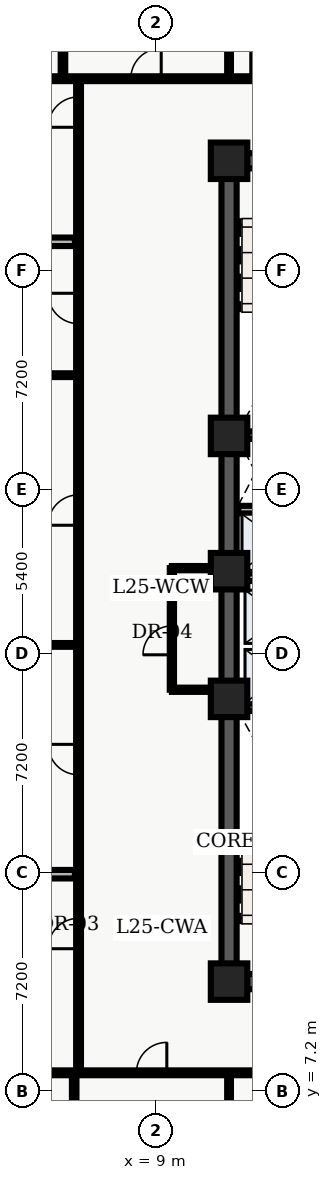
"""IFC4 building model, lengths in metres.
Left out: names, types, materials, properties, quantities, classifications, styles, units other than length and angle.
Written with IfcOpenShell. Run it as: python <this file> out.ifc"""

import sys

from ifc_helpers import new_model, entity, si_unit, converted_unit, direction, frame, origin_with_axes, origin_2d_with_axis, place, context, subcontext, project, spatial, polyline, rectangle, outline, extrude, element, fill, save


model = new_model("IFC4")
c1 = context("Model", 3, precision=1e-05, world=origin_with_axes(), true_north=direction((0.0, 1.0)))
c2 = subcontext(c1, "Body", "Model", "MODEL_VIEW")
j1 = project(units=[si_unit("LENGTHUNIT", "METRE"), converted_unit("PLANEANGLEUNIT", "DEGREE", entity("IfcPlaneAngleMeasure", 0.017), si_unit("PLANEANGLEUNIT", "RADIAN"), dimensions=[0, 0, 0, 0, 0, 0, 0])], contexts=[c1])
p1 = place(None, origin_with_axes())
s1 = spatial("IfcSite", under=j1, at=p1, CompositionType="ELEMENT")
p2 = place(p1, origin_with_axes())
s2 = spatial("IfcBuilding", under=s1, at=p2, CompositionType="ELEMENT")
p3 = place(p2, frame((0.0, 0.0, 104.7), z_axis=(0.0, 0.0, 1.0), x_axis=(1.0, 0.0, 0.0)))
s3 = spatial("IfcBuildingStorey", under=s2, at=p3, CompositionType="ELEMENT", Elevation=104.7)
p4 = place(p3, frame((11.4, 10.8, 0.0), z_axis=(0.0, 0.0, 1.0), x_axis=(0.0, 1.0, 0.0)))
e1 = element("IfcWall", 1, at=p4, inside=s3, PredefinedType="SHEAR", context=c2, shape_type="SweptSolid", body=[
    extrude(outline(polyline([(0.0, -0.25), (27.0, -0.25), (27.0, 0.25), (0.0, 0.25), (0.0, -0.25)])), origin_with_axes(), (0.0, 0.0, 1.0), 3.66),
])
p5 = place(p3, frame((11.4, 10.8, 0.0), z_axis=(0.0, 0.0, 1.0), x_axis=(1.0, 0.0, 0.0)))
e2 = element("IfcWall", 2, at=p5, inside=s3, PredefinedType="SHEAR", context=c2, shape_type="SweptSolid", body=[
    extrude(outline(polyline([(0.0, -0.25), (7.2, -0.25), (7.2, 0.25), (0.0, 0.25), (0.0, -0.25)])), origin_with_axes(), (0.0, 0.0, 1.0), 3.66),
])
p6 = place(p5, frame((2.625, 0.0, 0.0), z_axis=(0.0, 0.0, 1.0), x_axis=(1.0, 0.0, 0.0)))
e3 = element("IfcOpeningElement", 3, at=p6, cuts=e2, PredefinedType="OPENING", context=c2, shape_type="SweptSolid", body=[
    extrude(rectangle(XDim=1.05, YDim=0.52, at=origin_2d_with_axis()), origin_with_axes(), (0.0, 0.0, 1.0), 2.15),
])
p7 = place(p3, frame((11.4, 37.8, 0.0), z_axis=(0.0, 0.0, 1.0), x_axis=(1.0, 0.0, 0.0)))
e4 = element("IfcWall", 4, at=p7, inside=s3, PredefinedType="SHEAR", context=c2, shape_type="SweptSolid", body=[
    extrude(outline(polyline([(0.0, -0.25), (7.2, -0.25), (7.2, 0.25), (0.0, 0.25), (0.0, -0.25)])), origin_with_axes(), (0.0, 0.0, 1.0), 3.66),
])
p8 = place(p7, frame((2.625, 0.0, 0.0), z_axis=(0.0, 0.0, 1.0), x_axis=(1.0, 0.0, 0.0)))
e5 = element("IfcOpeningElement", 5, at=p8, cuts=e4, PredefinedType="OPENING", context=c2, shape_type="SweptSolid", body=[
    extrude(rectangle(XDim=1.05, YDim=0.52, at=origin_2d_with_axis()), origin_with_axes(), (0.0, 0.0, 1.0), 2.15),
])
for number, where, z_axis, x_axis in (
    (6, (11.65, 19.825, 0.0), (0.0, 0.0, 1.0), (1.0, 0.0, 0.0)),
    (7, (11.65, 28.775, 0.0), (0.0, 0.0, 1.0), (1.0, 0.0, 0.0)),
):
    element("IfcWall", number, at=place(p3, frame(where, z_axis=z_axis, x_axis=x_axis)), inside=s3, PredefinedType="SHEAR", context=c2, shape_type="SweptSolid", body=[
        extrude(outline(polyline([(0.0, -0.125), (6.7, -0.125), (6.7, 0.125), (0.0, 0.125), (0.0, -0.125)])), origin_with_axes(), (0.0, 0.0, 1.0), 3.66),
    ])
p9 = place(p3, frame((11.7, 24.1, 0.0), z_axis=(0.0, 0.0, 1.0), x_axis=(1.0, 0.0, 0.0)))
e8 = element("IfcWall", 8, at=p9, inside=s3, PredefinedType="SOLIDWALL", context=c2, shape_type="SweptSolid", body=[
    extrude(outline(polyline([(0.0, -0.125), (6.6, -0.125), (6.6, 0.125), (0.0, 0.125), (0.0, -0.125)])), origin_with_axes(), (0.0, 0.0, 1.0), 2.7),
])
p10 = place(p9, frame((3.75, 0.0, 0.0), z_axis=(0.0, 0.0, 1.0), x_axis=(1.0, 0.0, 0.0)))
e9 = element("IfcOpeningElement", 9, at=p10, cuts=e8, PredefinedType="OPENING", context=c2, shape_type="SweptSolid", body=[
    extrude(rectangle(XDim=0.9, YDim=0.27, at=origin_2d_with_axis()), origin_with_axes(), (0.0, 0.0, 1.0), 2.15),
])
p11 = place(p3, frame((11.7, 26.325, 0.0), z_axis=(0.0, 0.0, 1.0), x_axis=(1.0, 0.0, 0.0)))
e10 = element("IfcWall", 10, at=p11, inside=s3, PredefinedType="SOLIDWALL", context=c2, shape_type="SweptSolid", body=[
    extrude(outline(polyline([(0.0, -0.125), (6.6, -0.125), (6.6, 0.125), (0.0, 0.125), (0.0, -0.125)])), origin_with_axes(), (0.0, 0.0, 1.0), 2.7),
])
p12 = place(p11, frame((3.5, 0.0, 0.0), z_axis=(0.0, 0.0, 1.0), x_axis=(1.0, 0.0, 0.0)))
e11 = element("IfcOpeningElement", 11, at=p12, cuts=e10, PredefinedType="OPENING", context=c2, shape_type="SweptSolid", body=[
    extrude(rectangle(XDim=0.9, YDim=0.27, at=origin_2d_with_axis()), origin_with_axes(), (0.0, 0.0, 1.0), 2.15),
])
for number, where, z_axis, x_axis in (
    (12, (11.4, 10.8, 0.0), (0.0, 0.0, 1.0), (1.0, 0.0, 0.0)),
    (13, (11.4, 20.1, 0.0), (0.0, 0.0, 1.0), (1.0, 0.0, 0.0)),
    (14, (11.4, 24.3, 0.0), (0.0, 0.0, 1.0), (1.0, 0.0, 0.0)),
    (15, (11.4, 28.75, 0.0), (0.0, 0.0, 1.0), (1.0, 0.0, 0.0)),
    (16, (11.4, 37.8, 0.0), (0.0, 0.0, 1.0), (1.0, 0.0, 0.0)),
):
    element("IfcColumn", number, at=place(p3, frame(where, z_axis=z_axis, x_axis=x_axis)), inside=s3, PredefinedType="COLUMN", context=c2, shape_type="SweptSolid", body=[
        extrude(rectangle(XDim=1.2, YDim=1.2, at=origin_2d_with_axis()), origin_with_axes(), (0.0, 0.0, 1.0), 3.9),
    ])
p13 = place(p3, frame((9.52, 20.4, 0.0), z_axis=(0.0, 0.0, 1.0), x_axis=(0.0, 1.0, 0.0)))
e17 = element("IfcWall", 17, at=p13, inside=s3, PredefinedType="PARTITIONING", context=c2, shape_type="SweptSolid", body=[
    extrude(outline(polyline([(0.0, -0.07), (4.0, -0.07), (4.0, 0.07), (0.0, 0.07), (0.0, -0.07)])), origin_with_axes(), (0.0, 0.0, 1.0), 2.7),
])
p14 = place(p13, frame((1.625, 0.0, 0.0), z_axis=(0.0, 0.0, 1.0), x_axis=(1.0, 0.0, 0.0)))
e18 = element("IfcOpeningElement", 18, at=p14, cuts=e17, PredefinedType="OPENING", context=c2, shape_type="SweptSolid", body=[
    extrude(rectangle(XDim=0.95, YDim=0.16, at=origin_2d_with_axis()), origin_with_axes(), (0.0, 0.0, 1.0), 2.15),
])
for number, where, z_axis, x_axis in (
    (19, (9.52, 20.4, 0.0), (0.0, 0.0, 1.0), (1.0, 0.0, 0.0)),
    (20, (9.52, 24.4, 0.0), (0.0, 0.0, 1.0), (1.0, 0.0, 0.0)),
):
    element("IfcWall", number, at=place(p3, frame(where, z_axis=z_axis, x_axis=x_axis)), inside=s3, PredefinedType="PARTITIONING", context=c2, shape_type="SweptSolid", body=[
        extrude(outline(polyline([(0.0, -0.07), (1.58, -0.07), (1.58, 0.07), (0.0, 0.07), (0.0, -0.07)])), origin_with_axes(), (0.0, 0.0, 1.0), 2.7),
    ])
p15 = place(p3, frame((2.6, 7.8, 0.0), z_axis=(0.0, 0.0, 1.0), x_axis=(1.0, 0.0, 0.0)))
e21 = element("IfcWall", 21, at=p15, inside=s3, PredefinedType="PARTITIONING", context=c2, shape_type="SweptSolid", body=[
    extrude(outline(polyline([(0.0, -0.08), (18.55, -0.08), (18.55, 0.08), (0.0, 0.08), (0.0, -0.08)])), origin_with_axes(), (0.0, 0.0, 1.0), 2.7),
])
p16 = place(p15, frame((1.848, 0.0, 0.0), z_axis=(0.0, 0.0, 1.0), x_axis=(1.0, 0.0, 0.0)))
e22 = element("IfcOpeningElement", 22, at=p16, cuts=e21, PredefinedType="OPENING", context=c2, shape_type="SweptSolid", body=[
    extrude(rectangle(XDim=1.0, YDim=0.18, at=origin_2d_with_axis()), origin_with_axes(), (0.0, 0.0, 1.0), 2.15),
])
p17 = place(p15, frame((6.253, 0.0, 0.0), z_axis=(0.0, 0.0, 1.0), x_axis=(1.0, 0.0, 0.0)))
e23 = element("IfcOpeningElement", 23, at=p17, cuts=e21, PredefinedType="OPENING", context=c2, shape_type="SweptSolid", body=[
    extrude(rectangle(XDim=1.0, YDim=0.18, at=origin_2d_with_axis()), origin_with_axes(), (0.0, 0.0, 1.0), 2.15),
])
p18 = place(p15, frame((10.845, 0.0, 0.0), z_axis=(0.0, 0.0, 1.0), x_axis=(1.0, 0.0, 0.0)))
e24 = element("IfcOpeningElement", 24, at=p18, cuts=e21, PredefinedType="OPENING", context=c2, shape_type="SweptSolid", body=[
    extrude(rectangle(XDim=1.0, YDim=0.18, at=origin_2d_with_axis()), origin_with_axes(), (0.0, 0.0, 1.0), 2.15),
])
p19 = place(p15, frame((15.694, 0.0, 0.0), z_axis=(0.0, 0.0, 1.0), x_axis=(1.0, 0.0, 0.0)))
e25 = element("IfcOpeningElement", 25, at=p19, cuts=e21, PredefinedType="OPENING", context=c2, shape_type="SweptSolid", body=[
    extrude(rectangle(XDim=1.0, YDim=0.18, at=origin_2d_with_axis()), origin_with_axes(), (0.0, 0.0, 1.0), 2.15),
])
p20 = place(p3, frame((2.6, 40.5, 0.0), z_axis=(0.0, 0.0, 1.0), x_axis=(1.0, 0.0, 0.0)))
e26 = element("IfcWall", 26, at=p20, inside=s3, PredefinedType="PARTITIONING", context=c2, shape_type="SweptSolid", body=[
    extrude(outline(polyline([(0.0, -0.08), (18.65, -0.08), (18.65, 0.08), (0.0, 0.08), (0.0, -0.08)])), origin_with_axes(), (0.0, 0.0, 1.0), 2.7),
])
p21 = place(p20, frame((1.663, 0.0, 0.0), z_axis=(0.0, 0.0, 1.0), x_axis=(1.0, 0.0, 0.0)))
e27 = element("IfcOpeningElement", 27, at=p21, cuts=e26, PredefinedType="OPENING", context=c2, shape_type="SweptSolid", body=[
    extrude(rectangle(XDim=1.0, YDim=0.18, at=origin_2d_with_axis()), origin_with_axes(), (0.0, 0.0, 1.0), 2.15),
])
p22 = place(p20, frame((6.069, 0.0, 0.0), z_axis=(0.0, 0.0, 1.0), x_axis=(1.0, 0.0, 0.0)))
e28 = element("IfcOpeningElement", 28, at=p22, cuts=e26, PredefinedType="OPENING", context=c2, shape_type="SweptSolid", body=[
    extrude(rectangle(XDim=1.0, YDim=0.18, at=origin_2d_with_axis()), origin_with_axes(), (0.0, 0.0, 1.0), 2.15),
])
p23 = place(p20, frame((10.015, 0.0, 0.0), z_axis=(0.0, 0.0, 1.0), x_axis=(1.0, 0.0, 0.0)))
e29 = element("IfcOpeningElement", 29, at=p23, cuts=e26, PredefinedType="OPENING", context=c2, shape_type="SweptSolid", body=[
    extrude(rectangle(XDim=1.0, YDim=0.18, at=origin_2d_with_axis()), origin_with_axes(), (0.0, 0.0, 1.0), 2.15),
])
p24 = place(p20, frame((13.825, 0.0, 0.0), z_axis=(0.0, 0.0, 1.0), x_axis=(1.0, 0.0, 0.0)))
e30 = element("IfcOpeningElement", 30, at=p24, cuts=e26, PredefinedType="OPENING", context=c2, shape_type="SweptSolid", body=[
    extrude(rectangle(XDim=1.0, YDim=0.18, at=origin_2d_with_axis()), origin_with_axes(), (0.0, 0.0, 1.0), 2.15),
])
p25 = place(p3, frame((6.45, 7.8, 0.0), z_axis=(0.0, 0.0, 1.0), x_axis=(0.0, 1.0, 0.0)))
e31 = element("IfcWall", 31, at=p25, inside=s3, PredefinedType="PARTITIONING", context=c2, shape_type="SweptSolid", body=[
    extrude(outline(polyline([(0.0, -0.08), (32.7, -0.08), (32.7, 0.08), (0.0, 0.08), (0.0, -0.08)])), origin_with_axes(), (0.0, 0.0, 1.0), 2.7),
])
p26 = place(p25, frame((4.582, 0.0, 0.0), z_axis=(0.0, 0.0, 1.0), x_axis=(1.0, 0.0, 0.0)))
e32 = element("IfcOpeningElement", 32, at=p26, cuts=e31, PredefinedType="OPENING", context=c2, shape_type="SweptSolid", body=[
    extrude(rectangle(XDim=1.0, YDim=0.18, at=origin_2d_with_axis()), origin_with_axes(), (0.0, 0.0, 1.0), 2.15),
])
p27 = place(p25, frame((10.304, 0.0, 0.0), z_axis=(0.0, 0.0, 1.0), x_axis=(1.0, 0.0, 0.0)))
e33 = element("IfcOpeningElement", 33, at=p27, cuts=e31, PredefinedType="OPENING", context=c2, shape_type="SweptSolid", body=[
    extrude(rectangle(XDim=1.0, YDim=0.18, at=origin_2d_with_axis()), origin_with_axes(), (0.0, 0.0, 1.0), 2.15),
])
p28 = place(p25, frame((18.512, 0.0, 0.0), z_axis=(0.0, 0.0, 1.0), x_axis=(1.0, 0.0, 0.0)))
e34 = element("IfcOpeningElement", 34, at=p28, cuts=e31, PredefinedType="OPENING", context=c2, shape_type="SweptSolid", body=[
    extrude(rectangle(XDim=1.0, YDim=0.18, at=origin_2d_with_axis()), origin_with_axes(), (0.0, 0.0, 1.0), 2.15),
])
p29 = place(p25, frame((25.142, 0.0, 0.0), z_axis=(0.0, 0.0, 1.0), x_axis=(1.0, 0.0, 0.0)))
e35 = element("IfcOpeningElement", 35, at=p29, cuts=e31, PredefinedType="OPENING", context=c2, shape_type="SweptSolid", body=[
    extrude(rectangle(XDim=1.0, YDim=0.18, at=origin_2d_with_axis()), origin_with_axes(), (0.0, 0.0, 1.0), 2.15),
])
p30 = place(p25, frame((31.602, 0.0, 0.0), z_axis=(0.0, 0.0, 1.0), x_axis=(1.0, 0.0, 0.0)))
e36 = element("IfcOpeningElement", 36, at=p30, cuts=e31, PredefinedType="OPENING", context=c2, shape_type="SweptSolid", body=[
    extrude(rectangle(XDim=1.0, YDim=0.18, at=origin_2d_with_axis()), origin_with_axes(), (0.0, 0.0, 1.0), 2.15),
])
p31 = place(p3, frame((0.375, 14.333, 0.0), z_axis=(0.0, 0.0, 1.0), x_axis=(1.0, 0.0, 0.0)))
e37 = element("IfcWall", 37, at=p31, inside=s3, PredefinedType="PARTITIONING", context=c2, shape_type="SweptSolid", body=[
    extrude(outline(polyline([(0.0, -0.14), (5.955, -0.14), (5.955, 0.14), (0.0, 0.14), (0.0, -0.14)])), origin_with_axes(), (0.0, 0.0, 1.0), 2.7),
])
for number, where, z_axis, x_axis in (
    (38, (0.375, 21.875, 0.0), (0.0, 0.0, 1.0), (1.0, 0.0, 0.0)),
    (39, (0.375, 30.748, 0.0), (0.0, 0.0, 1.0), (1.0, 0.0, 0.0)),
):
    element("IfcWall", number, at=place(p3, frame(where, z_axis=z_axis, x_axis=x_axis)), inside=s3, PredefinedType="PARTITIONING", context=c2, shape_type="SweptSolid", body=[
        extrude(outline(polyline([(0.0, -0.062), (5.955, -0.062), (5.955, 0.062), (0.0, 0.062), (0.0, -0.062)])), origin_with_axes(), (0.0, 0.0, 1.0), 2.7),
    ])
p32 = place(p3, frame((0.375, 35.135, 0.0), z_axis=(0.0, 0.0, 1.0), x_axis=(1.0, 0.0, 0.0)))
e40 = element("IfcWall", 40, at=p32, inside=s3, PredefinedType="PARTITIONING", context=c2, shape_type="SweptSolid", body=[
    extrude(outline(polyline([(0.0, -0.14), (5.955, -0.14), (5.955, 0.14), (0.0, 0.14), (0.0, -0.14)])), origin_with_axes(), (0.0, 0.0, 1.0), 2.7),
])
p33 = place(p3, frame((6.306, 0.36, 0.0), z_axis=(0.0, 0.0, 1.0), x_axis=(0.0, 1.0, 0.0)))
e41 = element("IfcWall", 41, at=p33, inside=s3, PredefinedType="PARTITIONING", context=c2, shape_type="SweptSolid", body=[
    extrude(outline(polyline([(0.0, -0.075), (7.34, -0.075), (7.34, 0.075), (0.0, 0.075), (0.0, -0.075)])), origin_with_axes(), (0.0, 0.0, 1.0), 2.7),
])
p34 = place(p3, frame((11.4, 0.36, 0.0), z_axis=(0.0, 0.0, 1.0), x_axis=(0.0, 1.0, 0.0)))
e42 = element("IfcWall", 42, at=p34, inside=s3, PredefinedType="PARTITIONING", context=c2, shape_type="SweptSolid", body=[
    extrude(outline(polyline([(0.0, -0.062), (7.34, -0.062), (7.34, 0.062), (0.0, 0.062), (0.0, -0.062)])), origin_with_axes(), (0.0, 0.0, 1.0), 2.7),
])
p35 = place(p3, frame((5.937, 40.6, 0.0), z_axis=(0.0, 0.0, 1.0), x_axis=(0.0, 1.0, 0.0)))
e43 = element("IfcWall", 43, at=p35, inside=s3, PredefinedType="PARTITIONING", context=c2, shape_type="SweptSolid", body=[
    extrude(outline(polyline([(0.0, -0.075), (7.64, -0.075), (7.64, 0.075), (0.0, 0.075), (0.0, -0.075)])), origin_with_axes(), (0.0, 0.0, 1.0), 2.7),
])
p36 = place(p3, frame((11.4, 40.6, 0.0), z_axis=(0.0, 0.0, 1.0), x_axis=(0.0, 1.0, 0.0)))
e44 = element("IfcWall", 44, at=p36, inside=s3, PredefinedType="PARTITIONING", context=c2, shape_type="SweptSolid", body=[
    extrude(outline(polyline([(0.0, -0.062), (7.64, -0.062), (7.64, 0.062), (0.0, 0.062), (0.0, -0.062)])), origin_with_axes(), (0.0, 0.0, 1.0), 2.7),
])
p37 = place(p13, frame((1.625, 0.0, 0.0), z_axis=(0.0, 0.0, 1.0), x_axis=(1.0, 0.0, 0.0)))
e45 = element("IfcDoor", 45, at=p37, inside=s3, OperationType="SINGLE_SWING_LEFT", PredefinedType="DOOR", context=c2, shape_type="SweptSolid", body=[
    extrude(rectangle(XDim=0.95, YDim=0.084, at=origin_2d_with_axis()), origin_with_axes(), (0.0, 0.0, 1.0), 2.15),
])
fill(e18, e45)
p38 = place(p25, frame((4.582, 0.0, 0.0), z_axis=(0.0, 0.0, 1.0), x_axis=(1.0, 0.0, 0.0)))
e46 = element("IfcDoor", 46, at=p38, inside=s3, OperationType="SINGLE_SWING_LEFT", PredefinedType="DOOR", context=c2, shape_type="SweptSolid", body=[
    extrude(rectangle(XDim=1.0, YDim=0.09, at=origin_2d_with_axis()), origin_with_axes(), (0.0, 0.0, 1.0), 2.15),
])
fill(e32, e46)
p39 = place(p25, frame((10.304, 0.0, 0.0), z_axis=(0.0, 0.0, 1.0), x_axis=(1.0, 0.0, 0.0)))
e47 = element("IfcDoor", 47, at=p39, inside=s3, OperationType="SINGLE_SWING_RIGHT", PredefinedType="DOOR", context=c2, shape_type="SweptSolid", body=[
    extrude(rectangle(XDim=1.0, YDim=0.09, at=origin_2d_with_axis()), origin_with_axes(), (0.0, 0.0, 1.0), 2.15),
])
fill(e33, e47)
p40 = place(p25, frame((18.512, 0.0, 0.0), z_axis=(0.0, 0.0, 1.0), x_axis=(1.0, 0.0, 0.0)))
e48 = element("IfcDoor", 48, at=p40, inside=s3, OperationType="SINGLE_SWING_LEFT", PredefinedType="DOOR", context=c2, shape_type="SweptSolid", body=[
    extrude(rectangle(XDim=1.0, YDim=0.09, at=origin_2d_with_axis()), origin_with_axes(), (0.0, 0.0, 1.0), 2.15),
])
fill(e34, e48)
p41 = place(p25, frame((25.142, 0.0, 0.0), z_axis=(0.0, 0.0, 1.0), x_axis=(1.0, 0.0, 0.0)))
e49 = element("IfcDoor", 49, at=p41, inside=s3, OperationType="SINGLE_SWING_RIGHT", PredefinedType="DOOR", context=c2, shape_type="SweptSolid", body=[
    extrude(rectangle(XDim=1.0, YDim=0.09, at=origin_2d_with_axis()), origin_with_axes(), (0.0, 0.0, 1.0), 2.15),
])
fill(e35, e49)
p42 = place(p25, frame((31.602, 0.0, 0.0), z_axis=(0.0, 0.0, 1.0), x_axis=(1.0, 0.0, 0.0)))
e50 = element("IfcDoor", 50, at=p42, inside=s3, OperationType="SINGLE_SWING_LEFT", PredefinedType="DOOR", context=c2, shape_type="SweptSolid", body=[
    extrude(rectangle(XDim=1.0, YDim=0.09, at=origin_2d_with_axis()), origin_with_axes(), (0.0, 0.0, 1.0), 2.15),
])
fill(e36, e50)
p43 = place(p15, frame((6.253, 0.0, 0.0), z_axis=(0.0, 0.0, 1.0), x_axis=(1.0, 0.0, 0.0)))
e51 = element("IfcDoor", 51, at=p43, inside=s3, OperationType="SINGLE_SWING_RIGHT", PredefinedType="DOOR", context=c2, shape_type="SweptSolid", body=[
    extrude(rectangle(XDim=1.0, YDim=0.09, at=origin_2d_with_axis()), origin_with_axes(), (0.0, 0.0, 1.0), 2.15),
])
fill(e23, e51)
p44 = place(p20, frame((6.069, 0.0, 0.0), z_axis=(0.0, 0.0, 1.0), x_axis=(1.0, 0.0, 0.0)))
e52 = element("IfcDoor", 52, at=p44, inside=s3, OperationType="SINGLE_SWING_RIGHT", PredefinedType="DOOR", context=c2, shape_type="SweptSolid", body=[
    extrude(rectangle(XDim=1.0, YDim=0.09, at=origin_2d_with_axis()), origin_with_axes(), (0.0, 0.0, 1.0), 2.15),
])
fill(e28, e52)
p45 = place(p20, frame((10.015, 0.0, 0.0), z_axis=(0.0, 0.0, 1.0), x_axis=(1.0, 0.0, 0.0)))
e53 = element("IfcDoor", 53, at=p45, inside=s3, OperationType="SINGLE_SWING_LEFT", PredefinedType="DOOR", context=c2, shape_type="SweptSolid", body=[
    extrude(rectangle(XDim=1.0, YDim=0.09, at=origin_2d_with_axis()), origin_with_axes(), (0.0, 0.0, 1.0), 2.15),
])
fill(e29, e53)
save(model, sys.argv[1])
